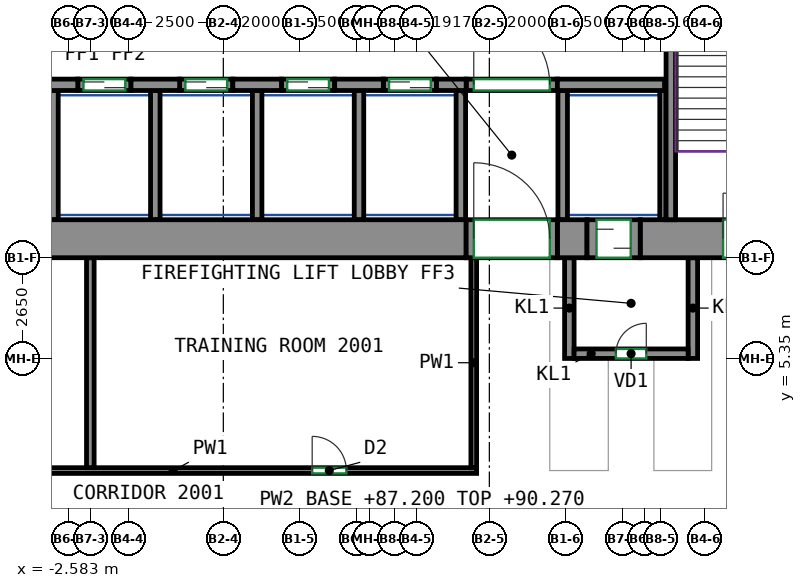
"""IFC4 building model, lengths in metres.
Left out: names, types, materials, properties, quantities, classifications, styles, units other than length and angle.
Written with IfcOpenShell. Run it as: python <this file> out.ifc"""

import sys

from ifc_helpers import new_model, si_unit, direction, frame, frame_2d, origin, place, context, subcontext, project, spatial, rectangle, extrude, source, transform, mapped, element, fill, save


model = new_model("IFC4")
c1 = context("Model", 3, precision=1e-05, world=origin(), true_north=direction((0.0, 1.0)))
c2 = subcontext(c1, "Body", "Model", "MODEL_VIEW")
j1 = project(units=[si_unit("LENGTHUNIT", "METRE"), si_unit("PLANEANGLEUNIT", "RADIAN")], contexts=[c1])
p1 = place(None, origin())
s1 = spatial("IfcSite", under=j1, at=p1, CompositionType="ELEMENT")
p2 = place(p1, origin())
s2 = spatial("IfcBuilding", under=s1, at=p2, CompositionType="ELEMENT")
p3 = place(p2, frame((0.0, 0.0, 87.2)))
s3 = spatial("IfcBuildingStorey", under=s2, at=p3, CompositionType="ELEMENT", Elevation=87.2)
m1 = source(origin(), c2, "Body", "SweptSolid", [
    extrude(rectangle(XDim=14.18, YDim=1.0, at=frame_2d((7.09, 0.0))), origin(), (0.0, 0.0, 1.0), 3.72),
])
p4 = place(p3, frame((-6.29, 8.5, 0.0), z_axis=(0.0, 0.0, 1.0), x_axis=(1.0, 0.0, 0.0)))
e1 = element("IfcWall", 1, at=p4, inside=s3, PredefinedType="SHEAR", context=c2, shape_type="MappedRepresentation", body=[
    mapped(m1, transform((0.0, 0.0, 0.0))),
])
m2 = source(origin(), c2, "Body", "SweptSolid", [
    extrude(rectangle(XDim=0.78, YDim=1.0, at=frame_2d((0.39, 0.0))), origin(), (0.0, 0.0, 1.0), 3.72),
])
p5 = place(p3, frame((10.29, 8.5, 0.0), z_axis=(0.0, 0.0, 1.0), x_axis=(1.0, 0.0, 0.0)))
e2 = element("IfcWall", 2, at=p5, inside=s3, PredefinedType="SHEAR", context=c2, shape_type="MappedRepresentation", body=[
    mapped(m2, transform((0.0, 0.0, 0.0))),
])
m3 = source(origin(), c2, "Body", "SweptSolid", [
    extrude(rectangle(XDim=5.63, YDim=1.0, at=frame_2d((2.815, 0.0))), origin(), (0.0, 0.0, 1.0), 3.72),
])
p6 = place(p3, frame((12.47, 8.5, 0.0), z_axis=(0.0, 0.0, 1.0), x_axis=(1.0, 0.0, 0.0)))
e3 = element("IfcWall", 3, at=p6, inside=s3, PredefinedType="SHEAR", context=c2, shape_type="MappedRepresentation", body=[
    mapped(m3, transform((0.0, 0.0, 0.0))),
])
p7 = place(p6, frame((2.18, 0.0, 0.0)))
e4 = element("IfcOpeningElement", 4, at=p7, cuts=e3, PredefinedType="OPENING", context=c2, shape_type="SweptSolid", body=[
    extrude(rectangle(XDim=1.2, YDim=2.1, at=frame_2d((0.6, 1.05))), frame((0.0, 0.51, 0.0), z_axis=(0.0, -1.0, 0.0), x_axis=(1.0, 0.0, 0.0)), (0.0, 0.0, 1.0), 1.02),
])
m4 = source(origin(), c2, "Body", "SweptSolid", [
    extrude(rectangle(XDim=7.75, YDim=0.25, at=frame_2d((3.875, 0.0))), origin(), (0.0, 0.0, 1.0), 3.72),
])
p8 = place(p3, frame((13.275, 9.0, 0.0), z_axis=(0.0, 0.0, 1.0), x_axis=(0.0, 1.0, 0.0)))
e5 = element("IfcWall", 5, at=p8, inside=s3, PredefinedType="SHEAR", context=c2, shape_type="MappedRepresentation", body=[
    mapped(m4, transform((0.0, 0.0, 0.0))),
])
m5 = source(origin(), c2, "Body", "SweptSolid", [
    extrude(rectangle(XDim=1.28, YDim=0.3, at=frame_2d((0.64, 0.0))), origin(), (0.0, 0.0, 1.0), 3.72),
])
for number, where, z_axis, x_axis in (
    (6, (-3.61, 12.55, 0.0), (0.0, 0.0, 1.0), (1.0, 0.0, 0.0)),
    (7, (-0.93, 12.55, 0.0), (0.0, 0.0, 1.0), (1.0, 0.0, 0.0)),
    (8, (1.75, 12.55, 0.0), (0.0, 0.0, 1.0), (1.0, 0.0, 0.0)),
    (9, (4.43, 12.55, 0.0), (0.0, 0.0, 1.0), (1.0, 0.0, 0.0)),
):
    element("IfcWall", number, at=place(p3, frame(where, z_axis=z_axis, x_axis=x_axis)), inside=s3, PredefinedType="SHEAR", context=c2, shape_type="MappedRepresentation", body=[
        mapped(m5, transform((0.0, 0.0, 0.0))),
    ])
m6 = source(origin(), c2, "Body", "SweptSolid", [
    extrude(rectangle(XDim=0.78, YDim=0.3, at=frame_2d((0.39, 0.0))), origin(), (0.0, 0.0, 1.0), 3.72),
])
p9 = place(p3, frame((7.11, 12.55, 0.0), z_axis=(0.0, 0.0, 1.0), x_axis=(1.0, 0.0, 0.0)))
e10 = element("IfcWall", 10, at=p9, inside=s3, PredefinedType="SHEAR", context=c2, shape_type="MappedRepresentation", body=[
    mapped(m6, transform((0.0, 0.0, 0.0))),
])
m7 = source(origin(), c2, "Body", "SweptSolid", [
    extrude(rectangle(XDim=2.82, YDim=0.3, at=frame_2d((1.41, 0.0))), origin(), (0.0, 0.0, 1.0), 3.72),
])
p10 = place(p3, frame((10.29, 12.55, 0.0), z_axis=(0.0, 0.0, 1.0), x_axis=(1.0, 0.0, 0.0)))
e11 = element("IfcWall", 11, at=p10, inside=s3, PredefinedType="SHEAR", context=c2, shape_type="MappedRepresentation", body=[
    mapped(m7, transform((0.0, 0.0, 0.0))),
])
m8 = source(origin(), c2, "Body", "SweptSolid", [
    extrude(rectangle(XDim=1.4, YDim=0.3, at=frame_2d((0.7, 0.0))), origin(), (0.0, 0.0, 1.0), 3.72),
])
p11 = place(p3, frame((-2.33, 12.55, 0.0), z_axis=(0.0, 0.0, 1.0), x_axis=(1.0, 0.0, 0.0)))
e12 = element("IfcWall", 12, at=p11, inside=s3, PredefinedType="PARTITIONING", context=c2, shape_type="MappedRepresentation", body=[
    mapped(m8, transform((0.0, 0.0, 0.0))),
])
p12 = place(p11, frame((0.15, 0.0, 0.0)))
e13 = element("IfcOpeningElement", 13, at=p12, cuts=e12, PredefinedType="OPENING", context=c2, shape_type="SweptSolid", body=[
    extrude(rectangle(XDim=1.1, YDim=2.1, at=frame_2d((0.55, 1.05))), frame((0.0, 0.16, 0.0), z_axis=(0.0, -1.0, 0.0), x_axis=(1.0, 0.0, 0.0)), (0.0, 0.0, 1.0), 0.32),
])
m9 = source(origin(), c2, "Body", "SweptSolid", [
    extrude(rectangle(XDim=1.4, YDim=0.3, at=frame_2d((0.7, 0.0))), origin(), (0.0, 0.0, 1.0), 3.72),
])
p13 = place(p3, frame((0.35, 12.55, 0.0), z_axis=(0.0, 0.0, 1.0), x_axis=(1.0, 0.0, 0.0)))
e14 = element("IfcWall", 14, at=p13, inside=s3, PredefinedType="PARTITIONING", context=c2, shape_type="MappedRepresentation", body=[
    mapped(m9, transform((0.0, 0.0, 0.0))),
])
p14 = place(p13, frame((0.15, 0.0, 0.0)))
e15 = element("IfcOpeningElement", 15, at=p14, cuts=e14, PredefinedType="OPENING", context=c2, shape_type="SweptSolid", body=[
    extrude(rectangle(XDim=1.1, YDim=2.1, at=frame_2d((0.55, 1.05))), frame((0.0, 0.16, 0.0), z_axis=(0.0, -1.0, 0.0), x_axis=(1.0, 0.0, 0.0)), (0.0, 0.0, 1.0), 0.32),
])
p15 = place(p3, frame((3.03, 12.55, 0.0), z_axis=(0.0, 0.0, 1.0), x_axis=(1.0, 0.0, 0.0)))
e16 = element("IfcWall", 16, at=p15, inside=s3, PredefinedType="PARTITIONING", context=c2, shape_type="MappedRepresentation", body=[
    mapped(m9, transform((0.0, 0.0, 0.0))),
])
p16 = place(p15, frame((0.15, 0.0, 0.0)))
e17 = element("IfcOpeningElement", 17, at=p16, cuts=e16, PredefinedType="OPENING", context=c2, shape_type="SweptSolid", body=[
    extrude(rectangle(XDim=1.1, YDim=2.1, at=frame_2d((0.55, 1.05))), frame((0.0, 0.16, 0.0), z_axis=(0.0, -1.0, 0.0), x_axis=(1.0, 0.0, 0.0)), (0.0, 0.0, 1.0), 0.32),
])
p17 = place(p3, frame((5.71, 12.55, 0.0), z_axis=(0.0, 0.0, 1.0), x_axis=(1.0, 0.0, 0.0)))
e18 = element("IfcWall", 18, at=p17, inside=s3, PredefinedType="PARTITIONING", context=c2, shape_type="MappedRepresentation", body=[
    mapped(m8, transform((0.0, 0.0, 0.0))),
])
p18 = place(p17, frame((0.15, 0.0, 0.0)))
e19 = element("IfcOpeningElement", 19, at=p18, cuts=e18, PredefinedType="OPENING", context=c2, shape_type="SweptSolid", body=[
    extrude(rectangle(XDim=1.1, YDim=2.1, at=frame_2d((0.55, 1.05))), frame((0.0, 0.16, 0.0), z_axis=(0.0, -1.0, 0.0), x_axis=(1.0, 0.0, 0.0)), (0.0, 0.0, 1.0), 0.32),
])
m10 = source(origin(), c2, "Body", "SweptSolid", [
    extrude(rectangle(XDim=2.4, YDim=0.3, at=frame_2d((1.2, 0.0))), origin(), (0.0, 0.0, 1.0), 3.72),
])
p19 = place(p3, frame((7.89, 12.55, 0.0), z_axis=(0.0, 0.0, 1.0), x_axis=(1.0, 0.0, 0.0)))
e20 = element("IfcWall", 20, at=p19, inside=s3, PredefinedType="PARTITIONING", context=c2, shape_type="MappedRepresentation", body=[
    mapped(m10, transform((0.0, 0.0, 0.0))),
])
p20 = place(p19, frame((0.2, 0.0, 0.0)))
e21 = element("IfcOpeningElement", 21, at=p20, cuts=e20, PredefinedType="OPENING", context=c2, shape_type="SweptSolid", body=[
    extrude(rectangle(XDim=2.0, YDim=2.1, at=frame_2d((1.0, 1.05))), frame((0.0, 0.16, 0.0), z_axis=(0.0, -1.0, 0.0), x_axis=(1.0, 0.0, 0.0)), (0.0, 0.0, 1.0), 0.32),
])
m11 = source(origin(), c2, "Body", "SweptSolid", [
    extrude(rectangle(XDim=2.65, YDim=0.25, at=frame_2d((1.325, 0.0))), origin(), (0.0, 0.0, 1.0), 3.72),
])
for number, where, z_axis, x_axis in (
    (22, (10.605, 5.35, 0.0), (0.0, 0.0, 1.0), (0.0, 1.0, 0.0)),
    (23, (13.855, 5.35, 0.0), (0.0, 0.0, 1.0), (0.0, 1.0, 0.0)),
):
    element("IfcWall", number, at=place(p3, frame(where, z_axis=z_axis, x_axis=x_axis)), inside=s3, PredefinedType="PARTITIONING", context=c2, shape_type="MappedRepresentation", body=[
        mapped(m11, transform((0.0, 0.0, 0.0))),
    ])
m12 = source(origin(), c2, "Body", "SweptSolid", [
    extrude(rectangle(XDim=3.0, YDim=0.25, at=frame_2d((1.5, 0.0))), origin(), (0.0, 0.0, 1.0), 3.72),
])
p21 = place(p3, frame((10.73, 5.475, 0.0), z_axis=(0.0, 0.0, 1.0), x_axis=(1.0, 0.0, 0.0)))
e24 = element("IfcWall", 24, at=p21, inside=s3, PredefinedType="PARTITIONING", context=c2, shape_type="MappedRepresentation", body=[
    mapped(m12, transform((0.0, 0.0, 0.0))),
])
p22 = place(p21, frame((1.1, 0.0, 0.0)))
e25 = element("IfcOpeningElement", 25, at=p22, cuts=e24, PredefinedType="OPENING", context=c2, shape_type="SweptSolid", body=[
    extrude(rectangle(XDim=0.8, YDim=2.0, at=frame_2d((0.4, 1.0))), frame((0.0, 0.135, 0.0), z_axis=(0.0, -1.0, 0.0), x_axis=(1.0, 0.0, 0.0)), (0.0, 0.0, 1.0), 0.27),
])
m13 = source(origin(), c2, "Body", "SweptSolid", [
    extrude(rectangle(XDim=3.4, YDim=0.25, at=frame_2d((1.7, 0.0))), origin(), (0.0, 0.0, 1.0), 3.72),
])
p23 = place(p3, frame((10.43, 9.0, 0.0), z_axis=(0.0, 0.0, 1.0), x_axis=(0.0, 1.0, 0.0)))
e26 = element("IfcWall", 26, at=p23, inside=s3, PredefinedType="PARTITIONING", context=c2, shape_type="MappedRepresentation", body=[
    mapped(m13, transform((0.0, 0.0, 0.0))),
])
m14 = source(origin(), c2, "Body", "SweptSolid", [
    extrude(rectangle(XDim=3.4, YDim=0.165, at=frame_2d((1.7, 0.0))), origin(), (0.0, 0.0, 1.0), 3.72),
])
p24 = place(p3, frame((13.067, 9.0, 0.0), z_axis=(0.0, 0.0, 1.0), x_axis=(0.0, 1.0, 0.0)))
e27 = element("IfcWall", 27, at=p24, inside=s3, PredefinedType="PARTITIONING", context=c2, shape_type="MappedRepresentation", body=[
    mapped(m14, transform((0.0, 0.0, 0.0))),
])
for number, where, z_axis, x_axis in (
    (28, (2.39, 9.0, 0.0), (0.0, 0.0, 1.0), (0.0, 1.0, 0.0)),
    (29, (5.07, 9.0, 0.0), (0.0, 0.0, 1.0), (0.0, 1.0, 0.0)),
    (30, (7.75, 9.0, 0.0), (0.0, 0.0, 1.0), (0.0, 1.0, 0.0)),
    (31, (-0.29, 9.0, 0.0), (0.0, 0.0, 1.0), (0.0, 1.0, 0.0)),
    (32, (-2.97, 9.0, 0.0), (0.0, 0.0, 1.0), (0.0, 1.0, 0.0)),
):
    element("IfcWall", number, at=place(p3, frame(where, z_axis=z_axis, x_axis=x_axis)), inside=s3, PredefinedType="PARTITIONING", context=c2, shape_type="MappedRepresentation", body=[
        mapped(m13, transform((0.0, 0.0, 0.0))),
    ])
m15 = source(origin(), c2, "Body", "SweptSolid", [
    extrude(rectangle(XDim=2.4, YDim=1.0, at=frame_2d((1.2, 0.0))), origin(), (0.0, 0.0, 1.0), 2.7),
])
p25 = place(p3, frame((7.89, 8.5, 0.0), z_axis=(0.0, 0.0, 1.0), x_axis=(1.0, 0.0, 0.0)))
e33 = element("IfcWall", 33, at=p25, inside=s3, PredefinedType="PARTITIONING", context=c2, shape_type="MappedRepresentation", body=[
    mapped(m15, transform((0.0, 0.0, 0.0))),
])
p26 = place(p25, frame((0.2, 0.0, 0.0)))
e34 = element("IfcOpeningElement", 34, at=p26, cuts=e33, PredefinedType="OPENING", context=c2, shape_type="SweptSolid", body=[
    extrude(rectangle(XDim=2.0, YDim=2.1, at=frame_2d((1.0, 1.05))), frame((0.0, 0.51, 0.0), z_axis=(0.0, -1.0, 0.0), x_axis=(1.0, 0.0, 0.0)), (0.0, 0.0, 1.0), 1.02),
])
m16 = source(origin(), c2, "Body", "SweptSolid", [
    extrude(rectangle(XDim=1.4, YDim=1.0, at=frame_2d((0.7, 0.0))), origin(), (0.0, 0.0, 1.0), 2.7),
])
p27 = place(p3, frame((11.07, 8.5, 0.0), z_axis=(0.0, 0.0, 1.0), x_axis=(1.0, 0.0, 0.0)))
e35 = element("IfcWall", 35, at=p27, inside=s3, PredefinedType="PARTITIONING", context=c2, shape_type="MappedRepresentation", body=[
    mapped(m16, transform((0.0, 0.0, 0.0))),
])
p28 = place(p27, frame((0.25, 0.0, 0.0)))
e36 = element("IfcOpeningElement", 36, at=p28, cuts=e35, PredefinedType="OPENING", context=c2, shape_type="SweptSolid", body=[
    extrude(rectangle(XDim=0.9, YDim=2.1, at=frame_2d((0.45, 1.05))), frame((0.0, 0.51, 0.0), z_axis=(0.0, -1.0, 0.0), x_axis=(1.0, 0.0, 0.0)), (0.0, 0.0, 1.0), 1.02),
])
p29 = place(p3, frame((-7.805, 2.4, 0.0), z_axis=(0.0, 0.0, 1.0), x_axis=(1.0, 0.0, 0.0)))
e37 = element("IfcWall", 37, at=p29, inside=s3, PredefinedType="PARTITIONING", context=c2, shape_type="SweptSolid", body=[
    extrude(rectangle(XDim=15.97, YDim=0.15, at=frame_2d((7.985, 0.0))), origin(), (0.0, 0.0, 1.0), 3.72),
])
p30 = place(p29, frame((3.812, 0.0, 0.0)))
e38 = element("IfcOpeningElement", 38, at=p30, cuts=e37, PredefinedType="OPENING", context=c2, shape_type="SweptSolid", body=[
    extrude(rectangle(XDim=0.9, YDim=2.1, at=frame_2d((0.45, 1.05))), frame((0.0, 0.085, 0.0), z_axis=(0.0, -1.0, 0.0), x_axis=(1.0, 0.0, 0.0)), (0.0, 0.0, 1.0), 0.17),
])
p31 = place(p29, frame((11.643, 0.0, 0.0)))
e39 = element("IfcOpeningElement", 39, at=p31, cuts=e37, PredefinedType="OPENING", context=c2, shape_type="SweptSolid", body=[
    extrude(rectangle(XDim=0.9, YDim=2.1, at=frame_2d((0.45, 1.05))), frame((0.0, 0.085, 0.0), z_axis=(0.0, -1.0, 0.0), x_axis=(1.0, 0.0, 0.0)), (0.0, 0.0, 1.0), 0.17),
])
p32 = place(p3, frame((8.09, 8.0, 0.0), z_axis=(0.0, 0.0, 1.0), x_axis=(0.0, -1.0, 0.0)))
e40 = element("IfcWall", 40, at=p32, inside=s3, PredefinedType="PARTITIONING", context=c2, shape_type="SweptSolid", body=[
    extrude(rectangle(XDim=5.525, YDim=0.15, at=frame_2d((2.762, 0.0))), origin(), (0.0, 0.0, 1.0), 3.72),
])
p33 = place(p3, frame((-2.0, 2.476, 0.0), z_axis=(0.0, 0.0, 1.0), x_axis=(0.0, 1.0, 0.0)))
e41 = element("IfcWall", 41, at=p33, inside=s3, PredefinedType="PARTITIONING", context=c2, shape_type="SweptSolid", body=[
    extrude(rectangle(XDim=5.524, YDim=0.2, at=frame_2d((2.762, 0.0))), origin(), (0.0, 0.0, 1.0), 3.72),
])
p34 = place(p20, origin())
e42 = element("IfcDoor", 42, at=p34, inside=s3, OperationType="DOUBLE_DOOR_SINGLE_SWING", PredefinedType="DOOR", context=c2, shape_type="SweptSolid", body=[
    extrude(rectangle(XDim=2.0, YDim=2.1, at=frame_2d((1.0, 1.05))), frame((0.0, 0.025, 0.0), z_axis=(0.0, -1.0, 0.0), x_axis=(1.0, 0.0, 0.0)), (0.0, 0.0, 1.0), 0.05),
])
fill(e21, e42)
p35 = place(p26, origin())
e43 = element("IfcDoor", 43, at=p35, inside=s3, OperationType="DOUBLE_DOOR_SINGLE_SWING", PredefinedType="DOOR", context=c2, shape_type="SweptSolid", body=[
    extrude(rectangle(XDim=2.0, YDim=2.1, at=frame_2d((1.0, 1.05))), frame((0.0, 0.405, 0.0), z_axis=(0.0, -1.0, 0.0), x_axis=(1.0, 0.0, 0.0)), (0.0, 0.0, 1.0), 0.05),
])
fill(e34, e43)
p36 = place(p22, origin())
e44 = element("IfcDoor", 44, at=p36, inside=s3, OperationType="SINGLE_SWING_RIGHT", PredefinedType="DOOR", context=c2, shape_type="SweptSolid", body=[
    extrude(rectangle(XDim=0.8, YDim=2.0, at=frame_2d((0.4, 1.0))), frame((0.0, 0.025, 0.0), z_axis=(0.0, -1.0, 0.0), x_axis=(1.0, 0.0, 0.0)), (0.0, 0.0, 1.0), 0.05),
])
fill(e25, e44)
p37 = place(p28, origin())
e45 = element("IfcDoor", 45, at=p37, inside=s3, OperationType="SLIDING_TO_LEFT", PredefinedType="DOOR", context=c2, shape_type="SweptSolid", body=[
    extrude(rectangle(XDim=0.9, YDim=2.1, at=frame_2d((0.45, 1.05))), frame((0.0, 0.405, 0.0), z_axis=(0.0, -1.0, 0.0), x_axis=(1.0, 0.0, 0.0)), (0.0, 0.0, 1.0), 0.05),
])
fill(e36, e45)
p38 = place(p12, origin())
e46 = element("IfcDoor", 46, at=p38, inside=s3, OperationType="DOUBLE_DOOR_SLIDING", PredefinedType="DOOR", context=c2, shape_type="SweptSolid", body=[
    extrude(rectangle(XDim=1.1, YDim=2.1, at=frame_2d((0.55, 1.05))), frame((0.0, 0.025, 0.0), z_axis=(0.0, -1.0, 0.0), x_axis=(1.0, 0.0, 0.0)), (0.0, 0.0, 1.0), 0.05),
])
fill(e13, e46)
p39 = place(p14, origin())
e47 = element("IfcDoor", 47, at=p39, inside=s3, OperationType="DOUBLE_DOOR_SLIDING", PredefinedType="DOOR", context=c2, shape_type="SweptSolid", body=[
    extrude(rectangle(XDim=1.1, YDim=2.1, at=frame_2d((0.55, 1.05))), frame((0.0, 0.025, 0.0), z_axis=(0.0, -1.0, 0.0), x_axis=(1.0, 0.0, 0.0)), (0.0, 0.0, 1.0), 0.05),
])
fill(e15, e47)
p40 = place(p16, origin())
e48 = element("IfcDoor", 48, at=p40, inside=s3, OperationType="DOUBLE_DOOR_SLIDING", PredefinedType="DOOR", context=c2, shape_type="SweptSolid", body=[
    extrude(rectangle(XDim=1.1, YDim=2.1, at=frame_2d((0.55, 1.05))), frame((0.0, 0.025, 0.0), z_axis=(0.0, -1.0, 0.0), x_axis=(1.0, 0.0, 0.0)), (0.0, 0.0, 1.0), 0.05),
])
fill(e17, e48)
p41 = place(p18, origin())
e49 = element("IfcDoor", 49, at=p41, inside=s3, OperationType="DOUBLE_DOOR_SLIDING", PredefinedType="DOOR", context=c2, shape_type="SweptSolid", body=[
    extrude(rectangle(XDim=1.1, YDim=2.1, at=frame_2d((0.55, 1.05))), frame((0.0, 0.025, 0.0), z_axis=(0.0, -1.0, 0.0), x_axis=(1.0, 0.0, 0.0)), (0.0, 0.0, 1.0), 0.05),
])
fill(e19, e49)
p42 = place(p7, origin())
e50 = element("IfcDoor", 50, at=p42, inside=s3, OperationType="DOUBLE_DOOR_SINGLE_SWING", PredefinedType="DOOR", context=c2, shape_type="SweptSolid", body=[
    extrude(rectangle(XDim=1.2, YDim=2.1, at=frame_2d((0.6, 1.05))), frame((0.0, 0.405, 0.0), z_axis=(0.0, -1.0, 0.0), x_axis=(1.0, 0.0, 0.0)), (0.0, 0.0, 1.0), 0.05),
])
fill(e4, e50)
p43 = place(p31, origin())
e51 = element("IfcDoor", 51, at=p43, inside=s3, OperationType="SINGLE_SWING_LEFT", PredefinedType="DOOR", context=c2, shape_type="SweptSolid", body=[
    extrude(rectangle(XDim=0.9, YDim=2.1, at=frame_2d((0.45, 1.05))), frame((0.0, 0.025, 0.0), z_axis=(0.0, -1.0, 0.0), x_axis=(1.0, 0.0, 0.0)), (0.0, 0.0, 1.0), 0.05),
])
fill(e39, e51)
save(model, sys.argv[1])
